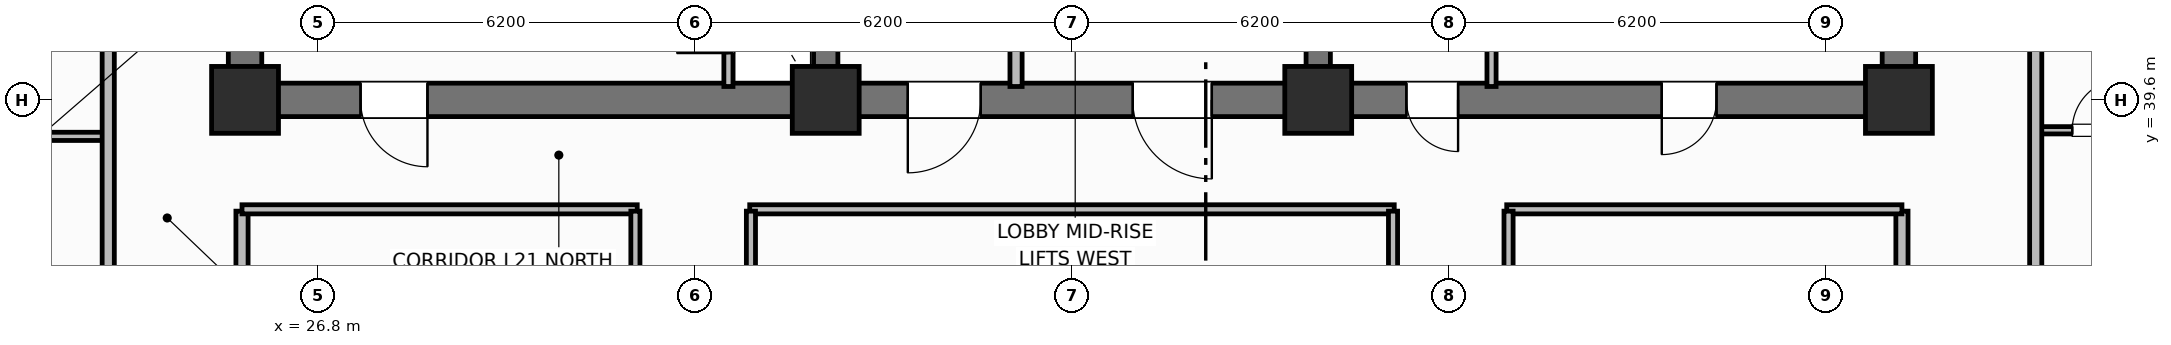
"""IFC4 building model, lengths in metres.
Left out: names, types, materials, properties, quantities, classifications, styles, units other than length and angle.
Written with IfcOpenShell. Run it as: python <this file> out.ifc"""

import sys

from ifc_helpers import new_model, si_unit, direction, frame, frame_2d, origin, origin_2d, place, context, subcontext, project, spatial, rectangle, extrude, element, fill, save


model = new_model("IFC4")
c1 = context("Model", 3, precision=1e-05, world=origin(), true_north=direction((0.0, 1.0)))
c2 = subcontext(c1, "Body", "Model", "MODEL_VIEW")
j1 = project(units=[si_unit("LENGTHUNIT", "METRE"), si_unit("PLANEANGLEUNIT", "RADIAN")], contexts=[c1])
p1 = place(None, origin())
s1 = spatial("IfcSite", under=j1, at=p1, CompositionType="ELEMENT")
p2 = place(p1, origin())
s2 = spatial("IfcBuilding", under=s1, at=p2, CompositionType="ELEMENT")
p3 = place(p2, frame((0.0, 0.0, 88.3)))
s3 = spatial("IfcBuildingStorey", under=s2, at=p3, CompositionType="ELEMENT", Elevation=88.3)
for number, where, z_axis, x_axis in (
    (1, (25.6, 39.875, 0.0), (0.0, 0.0, 1.0), (0.0, 1.0, 0.0)),
    (2, (52.8, 39.875, 0.0), (0.0, 0.0, 1.0), (0.0, 1.0, 0.0)),
):
    element("IfcWall", number, at=place(p3, frame(where, z_axis=z_axis, x_axis=x_axis)), inside=s3, PredefinedType="SHEAR", context=c2, shape_type="SweptSolid", body=[
        extrude(rectangle(XDim=5.65, YDim=0.55, at=frame_2d((2.825, 0.0))), origin(), (0.0, 0.0, 1.0), 3.7),
    ])
p4 = place(p3, frame((52.8, 39.6, 0.0), z_axis=(0.0, 0.0, 1.0), x_axis=(-1.0, 0.0, 0.0)))
e3 = element("IfcWall", 3, at=p4, inside=s3, PredefinedType="SHEAR", context=c2, shape_type="SweptSolid", body=[
    extrude(rectangle(XDim=27.2, YDim=0.55, at=frame_2d((13.6, 0.0))), origin(), (0.0, 0.0, 1.0), 3.7),
])
p5 = place(p4, frame((24.2, 0.0, 0.0)))
e4 = element("IfcOpeningElement", 4, at=p5, cuts=e3, PredefinedType="OPENING", context=c2, shape_type="SweptSolid", body=[
    extrude(rectangle(XDim=1.1, YDim=2.15, at=frame_2d((0.55, 1.075))), frame((0.0, 0.285, 0.0), z_axis=(0.0, -1.0, 0.0), x_axis=(1.0, 0.0, 0.0)), (0.0, 0.0, 1.0), 0.57),
])
p6 = place(p4, frame((15.1, 0.0, 0.0)))
e5 = element("IfcOpeningElement", 5, at=p6, cuts=e3, PredefinedType="OPENING", context=c2, shape_type="SweptSolid", body=[
    extrude(rectangle(XDim=1.2, YDim=2.15, at=frame_2d((0.6, 1.075))), frame((0.0, 0.285, 0.0), z_axis=(0.0, -1.0, 0.0), x_axis=(1.0, 0.0, 0.0)), (0.0, 0.0, 1.0), 0.57),
])
p7 = place(p4, frame((11.3, 0.0, 0.0)))
e6 = element("IfcOpeningElement", 6, at=p7, cuts=e3, PredefinedType="OPENING", context=c2, shape_type="SweptSolid", body=[
    extrude(rectangle(XDim=1.3, YDim=2.2, at=frame_2d((0.65, 1.1))), frame((0.0, 0.285, 0.0), z_axis=(0.0, -1.0, 0.0), x_axis=(1.0, 0.0, 0.0)), (0.0, 0.0, 1.0), 0.57),
])
p8 = place(p4, frame((7.25, 0.0, 0.0)))
e7 = element("IfcOpeningElement", 7, at=p8, cuts=e3, PredefinedType="OPENING", context=c2, shape_type="SweptSolid", body=[
    extrude(rectangle(XDim=0.85, YDim=2.1, at=frame_2d((0.425, 1.05))), frame((0.0, 0.285, 0.0), z_axis=(0.0, -1.0, 0.0), x_axis=(1.0, 0.0, 0.0)), (0.0, 0.0, 1.0), 0.57),
])
p9 = place(p4, frame((3.0, 0.0, 0.0)))
e8 = element("IfcOpeningElement", 8, at=p9, cuts=e3, PredefinedType="OPENING", context=c2, shape_type="SweptSolid", body=[
    extrude(rectangle(XDim=0.9, YDim=2.1, at=frame_2d((0.45, 1.05))), frame((0.0, 0.285, 0.0), z_axis=(0.0, -1.0, 0.0), x_axis=(1.0, 0.0, 0.0)), (0.0, 0.0, 1.0), 0.57),
])
for number, where, z_axis, x_axis in (
    (9, (35.15, 39.875, 0.0), (0.0, 0.0, 1.0), (0.0, 1.0, 0.0)),
    (10, (43.25, 39.875, 0.0), (0.0, 0.0, 1.0), (0.0, 1.0, 0.0)),
):
    element("IfcWall", number, at=place(p3, frame(where, z_axis=z_axis, x_axis=x_axis)), inside=s3, PredefinedType="SHEAR", context=c2, shape_type="SweptSolid", body=[
        extrude(rectangle(XDim=5.65, YDim=0.4, at=frame_2d((2.825, 0.0))), origin(), (0.0, 0.0, 1.0), 3.7),
    ])
for number, where, z_axis, x_axis in (
    (11, (25.6, 39.6, 0.0), (0.0, 0.0, 1.0), (1.0, 0.0, 0.0)),
    (12, (35.15, 39.6, 0.0), (0.0, 0.0, 1.0), (1.0, 0.0, 0.0)),
    (13, (43.25, 39.6, 0.0), (0.0, 0.0, 1.0), (1.0, 0.0, 0.0)),
    (14, (52.8, 39.6, 0.0), (0.0, 0.0, 1.0), (1.0, 0.0, 0.0)),
):
    element("IfcColumn", number, at=place(p3, frame(where, z_axis=z_axis, x_axis=x_axis)), inside=s3, PredefinedType="COLUMN", context=c2, shape_type="SweptSolid", body=[
        extrude(rectangle(XDim=1.1, YDim=1.1, at=origin_2d()), origin(), (0.0, 0.0, 1.0), 3.7),
    ])
p10 = place(p3, frame((33.55, 39.82, 0.0), z_axis=(0.0, 0.0, 1.0), x_axis=(0.0, 1.0, 0.0)))
e15 = element("IfcWall", 15, at=p10, inside=s3, PredefinedType="PARTITIONING", context=c2, shape_type="SweptSolid", body=[
    extrude(rectangle(XDim=2.13, YDim=0.15, at=frame_2d((1.065, 0.0))), origin(), (0.0, 0.0, 1.0), 2.53),
])
p11 = place(p10, frame((0.55, 0.0, 0.0)))
e16 = element("IfcOpeningElement", 16, at=p11, cuts=e15, PredefinedType="OPENING", context=c2, shape_type="SweptSolid", body=[
    extrude(rectangle(XDim=0.85, YDim=2.05, at=frame_2d((0.425, 1.025))), frame((0.0, 0.085, 0.0), z_axis=(0.0, -1.0, 0.0), x_axis=(1.0, 0.0, 0.0)), (0.0, 0.0, 1.0), 0.17),
])
p12 = place(p3, frame((38.28, 39.82, 0.0), z_axis=(0.0, 0.0, 1.0), x_axis=(0.0, 1.0, 0.0)))
e17 = element("IfcWall", 17, at=p12, inside=s3, PredefinedType="PARTITIONING", context=c2, shape_type="SweptSolid", body=[
    extrude(rectangle(XDim=2.73, YDim=0.2, at=frame_2d((1.365, 0.0))), origin(), (0.0, 0.0, 1.0), 2.53),
])
p13 = place(p3, frame((46.1, 39.82, 0.0), z_axis=(0.0, 0.0, 1.0), x_axis=(0.0, 1.0, 0.0)))
e18 = element("IfcWall", 18, at=p13, inside=s3, PredefinedType="PARTITIONING", context=c2, shape_type="SweptSolid", body=[
    extrude(rectangle(XDim=2.73, YDim=0.15, at=frame_2d((1.365, 0.0))), origin(), (0.0, 0.0, 1.0), 2.53),
])
for number, where, z_axis, x_axis in (
    (19, (25.55, 18.63, 0.0), (0.0, 0.0, 1.0), (0.0, 1.0, 0.0)),
    (20, (52.85, 18.63, 0.0), (0.0, 0.0, 1.0), (0.0, 1.0, 0.0)),
):
    element("IfcWall", number, at=place(p3, frame(where, z_axis=z_axis, x_axis=x_axis)), inside=s3, PredefinedType="PARTITIONING", context=c2, shape_type="SweptSolid", body=[
        extrude(rectangle(XDim=19.14, YDim=0.2, at=frame_2d((9.57, 0.0))), origin(), (0.0, 0.0, 1.0), 2.53),
    ])
p14 = place(p3, frame((25.55, 37.8, 0.0), z_axis=(0.0, 0.0, 1.0), x_axis=(1.0, 0.0, 0.0)))
e21 = element("IfcWall", 21, at=p14, inside=s3, PredefinedType="PARTITIONING", context=c2, shape_type="SweptSolid", body=[
    extrude(rectangle(XDim=6.5, YDim=0.15, at=frame_2d((3.25, 0.0))), origin(), (0.0, 0.0, 1.0), 2.53),
])
p15 = place(p3, frame((33.9, 37.8, 0.0), z_axis=(0.0, 0.0, 1.0), x_axis=(1.0, 0.0, 0.0)))
e22 = element("IfcWall", 22, at=p15, inside=s3, PredefinedType="PARTITIONING", context=c2, shape_type="SweptSolid", body=[
    extrude(rectangle(XDim=10.6, YDim=0.15, at=frame_2d((5.3, 0.0))), origin(), (0.0, 0.0, 1.0), 2.53),
])
p16 = place(p3, frame((46.35, 37.8, 0.0), z_axis=(0.0, 0.0, 1.0), x_axis=(1.0, 0.0, 0.0)))
e23 = element("IfcWall", 23, at=p16, inside=s3, PredefinedType="PARTITIONING", context=c2, shape_type="SweptSolid", body=[
    extrude(rectangle(XDim=6.5, YDim=0.15, at=frame_2d((3.25, 0.0))), origin(), (0.0, 0.0, 1.0), 2.53),
])
p17 = place(p3, frame((32.02, 18.63, 0.0), z_axis=(0.0, 0.0, 1.0), x_axis=(0.0, 1.0, 0.0)))
e24 = element("IfcWall", 24, at=p17, inside=s3, PredefinedType="PARTITIONING", context=c2, shape_type="SweptSolid", body=[
    extrude(rectangle(XDim=19.14, YDim=0.15, at=frame_2d((9.57, 0.0))), origin(), (0.0, 0.0, 1.0), 2.53),
])
p18 = place(p17, frame((3.0, 0.0, 0.0)))
e25 = element("IfcOpeningElement", 25, at=p18, cuts=e24, PredefinedType="OPENING", context=c2, shape_type="SweptSolid", body=[
    extrude(rectangle(XDim=0.9, YDim=2.1, at=frame_2d((0.45, 1.05))), frame((0.0, 0.085, 0.0), z_axis=(0.0, -1.0, 0.0), x_axis=(1.0, 0.0, 0.0)), (0.0, 0.0, 1.0), 0.17),
])
p19 = place(p17, frame((11.5, 0.0, 0.0)))
e26 = element("IfcOpeningElement", 26, at=p19, cuts=e24, PredefinedType="OPENING", context=c2, shape_type="SweptSolid", body=[
    extrude(rectangle(XDim=0.9, YDim=2.1, at=frame_2d((0.45, 1.05))), frame((0.0, 0.085, 0.0), z_axis=(0.0, -1.0, 0.0), x_axis=(1.0, 0.0, 0.0)), (0.0, 0.0, 1.0), 0.17),
])
p20 = place(p3, frame((33.92, 18.63, 0.0), z_axis=(0.0, 0.0, 1.0), x_axis=(0.0, 1.0, 0.0)))
e27 = element("IfcWall", 27, at=p20, inside=s3, PredefinedType="PARTITIONING", context=c2, shape_type="SweptSolid", body=[
    extrude(rectangle(XDim=19.14, YDim=0.15, at=frame_2d((9.57, 0.0))), origin(), (0.0, 0.0, 1.0), 2.53),
])
p21 = place(p20, frame((2.4, 0.0, 0.0)))
e28 = element("IfcOpeningElement", 28, at=p21, cuts=e27, PredefinedType="OPENING", context=c2, shape_type="SweptSolid", body=[
    extrude(rectangle(XDim=0.9, YDim=2.1, at=frame_2d((0.45, 1.05))), frame((0.0, 0.085, 0.0), z_axis=(0.0, -1.0, 0.0), x_axis=(1.0, 0.0, 0.0)), (0.0, 0.0, 1.0), 0.17),
])
p22 = place(p3, frame((44.48, 18.63, 0.0), z_axis=(0.0, 0.0, 1.0), x_axis=(0.0, 1.0, 0.0)))
e29 = element("IfcWall", 29, at=p22, inside=s3, PredefinedType="PARTITIONING", context=c2, shape_type="SweptSolid", body=[
    extrude(rectangle(XDim=19.14, YDim=0.15, at=frame_2d((9.57, 0.0))), origin(), (0.0, 0.0, 1.0), 2.53),
])
p23 = place(p22, frame((8.89, 0.0, 0.0)))
e30 = element("IfcOpeningElement", 30, at=p23, cuts=e29, PredefinedType="OPENING", context=c2, shape_type="SweptSolid", body=[
    extrude(rectangle(XDim=0.9, YDim=2.1, at=frame_2d((0.45, 1.05))), frame((0.0, 0.085, 0.0), z_axis=(0.0, -1.0, 0.0), x_axis=(1.0, 0.0, 0.0)), (0.0, 0.0, 1.0), 0.17),
])
p24 = place(p3, frame((46.38, 18.63, 0.0), z_axis=(0.0, 0.0, 1.0), x_axis=(0.0, 1.0, 0.0)))
e31 = element("IfcWall", 31, at=p24, inside=s3, PredefinedType="PARTITIONING", context=c2, shape_type="SweptSolid", body=[
    extrude(rectangle(XDim=19.14, YDim=0.15, at=frame_2d((9.57, 0.0))), origin(), (0.0, 0.0, 1.0), 2.53),
])
p25 = place(p24, frame((5.5, 0.0, 0.0)))
e32 = element("IfcOpeningElement", 32, at=p25, cuts=e31, PredefinedType="OPENING", context=c2, shape_type="SweptSolid", body=[
    extrude(rectangle(XDim=1.0, YDim=2.15, at=frame_2d((0.5, 1.075))), frame((0.0, 0.085, 0.0), z_axis=(0.0, -1.0, 0.0), x_axis=(1.0, 0.0, 0.0)), (0.0, 0.0, 1.0), 0.17),
])
p26 = place(p3, frame((21.1, 39.0, 0.0), z_axis=(0.0, 0.0, 1.0), x_axis=(1.0, 0.0, 0.0)))
e33 = element("IfcWall", 33, at=p26, inside=s3, PredefinedType="PARTITIONING", context=c2, shape_type="SweptSolid", body=[
    extrude(rectangle(XDim=2.25, YDim=0.135, at=frame_2d((1.125, 0.0))), origin(), (0.0, 0.0, 1.0), 2.53),
])
p27 = place(p3, frame((23.35, 10.6, 0.0), z_axis=(0.0, 0.0, 1.0), x_axis=(0.0, 1.0, 0.0)))
e34 = element("IfcWall", 34, at=p27, inside=s3, PredefinedType="PARTITIONING", context=c2, shape_type="SweptSolid", body=[
    extrude(rectangle(XDim=35.2, YDim=0.2, at=frame_2d((17.6, 0.0))), origin(), (0.0, 0.0, 1.0), 2.53),
])
p28 = place(p27, frame((2.65, 0.0, 0.0)))
e35 = element("IfcOpeningElement", 35, at=p28, cuts=e34, PredefinedType="OPENING", context=c2, shape_type="SweptSolid", body=[
    extrude(rectangle(XDim=1.0, YDim=2.15, at=frame_2d((0.5, 1.075))), frame((0.0, 0.11, 0.0), z_axis=(0.0, -1.0, 0.0), x_axis=(1.0, 0.0, 0.0)), (0.0, 0.0, 1.0), 0.22),
])
p29 = place(p27, frame((22.75, 0.0, 0.0)))
e36 = element("IfcOpeningElement", 36, at=p29, cuts=e34, PredefinedType="OPENING", context=c2, shape_type="SweptSolid", body=[
    extrude(rectangle(XDim=1.0, YDim=2.15, at=frame_2d((0.5, 1.075))), frame((0.0, 0.11, 0.0), z_axis=(0.0, -1.0, 0.0), x_axis=(1.0, 0.0, 0.0)), (0.0, 0.0, 1.0), 0.22),
])
p30 = place(p3, frame((55.05, 39.1, 0.0), z_axis=(0.0, 0.0, 1.0), x_axis=(1.0, 0.0, 0.0)))
e37 = element("IfcWall", 37, at=p30, inside=s3, PredefinedType="PARTITIONING", context=c2, shape_type="SweptSolid", body=[
    extrude(rectangle(XDim=2.25, YDim=0.12, at=frame_2d((1.125, 0.0))), origin(), (0.0, 0.0, 1.0), 2.53),
])
p31 = place(p30, frame((0.6, 0.0, 0.0)))
e38 = element("IfcOpeningElement", 38, at=p31, cuts=e37, PredefinedType="OPENING", context=c2, shape_type="SweptSolid", body=[
    extrude(rectangle(XDim=0.85, YDim=2.1, at=frame_2d((0.425, 1.05))), frame((0.0, 0.07, 0.0), z_axis=(0.0, -1.0, 0.0), x_axis=(1.0, 0.0, 0.0)), (0.0, 0.0, 1.0), 0.14),
])
p32 = place(p3, frame((55.05, 10.6, 0.0), z_axis=(0.0, 0.0, 1.0), x_axis=(0.0, 1.0, 0.0)))
e39 = element("IfcWall", 39, at=p32, inside=s3, PredefinedType="PARTITIONING", context=c2, shape_type="SweptSolid", body=[
    extrude(rectangle(XDim=35.2, YDim=0.2, at=frame_2d((17.6, 0.0))), origin(), (0.0, 0.0, 1.0), 2.53),
])
p33 = place(p32, frame((2.65, 0.0, 0.0)))
e40 = element("IfcOpeningElement", 40, at=p33, cuts=e39, PredefinedType="OPENING", context=c2, shape_type="SweptSolid", body=[
    extrude(rectangle(XDim=1.0, YDim=2.15, at=frame_2d((0.5, 1.075))), frame((0.0, 0.11, 0.0), z_axis=(0.0, -1.0, 0.0), x_axis=(1.0, 0.0, 0.0)), (0.0, 0.0, 1.0), 0.22),
])
p34 = place(p32, frame((11.814, 0.0, 0.0)))
e41 = element("IfcOpeningElement", 41, at=p34, cuts=e39, PredefinedType="OPENING", context=c2, shape_type="SweptSolid", body=[
    extrude(rectangle(XDim=1.0, YDim=2.15, at=frame_2d((0.5, 1.075))), frame((0.0, 0.11, 0.0), z_axis=(0.0, -1.0, 0.0), x_axis=(1.0, 0.0, 0.0)), (0.0, 0.0, 1.0), 0.22),
])
p35 = place(p32, frame((23.65, 0.0, 0.0)))
e42 = element("IfcOpeningElement", 42, at=p35, cuts=e39, PredefinedType="OPENING", context=c2, shape_type="SweptSolid", body=[
    extrude(rectangle(XDim=1.0, YDim=2.15, at=frame_2d((0.5, 1.075))), frame((0.0, 0.11, 0.0), z_axis=(0.0, -1.0, 0.0), x_axis=(1.0, 0.0, 0.0)), (0.0, 0.0, 1.0), 0.22),
])
p36 = place(p11, origin())
e43 = element("IfcDoor", 43, at=p36, inside=s3, OperationType="SINGLE_SWING_LEFT", PredefinedType="TRAPDOOR", context=c2, shape_type="SweptSolid", body=[
    extrude(rectangle(XDim=0.85, YDim=2.05, at=frame_2d((0.425, 1.025))), frame((0.0, 0.025, 0.0), z_axis=(0.0, -1.0, 0.0), x_axis=(1.0, 0.0, 0.0)), (0.0, 0.0, 1.0), 0.05),
])
fill(e16, e43)
p37 = place(p31, origin())
e44 = element("IfcDoor", 44, at=p37, inside=s3, OperationType="SINGLE_SWING_RIGHT", PredefinedType="DOOR", context=c2, shape_type="SweptSolid", body=[
    extrude(rectangle(XDim=0.85, YDim=2.1, at=frame_2d((0.425, 1.05))), frame((0.0, 0.025, 0.0), z_axis=(0.0, -1.0, 0.0), x_axis=(1.0, 0.0, 0.0)), (0.0, 0.0, 1.0), 0.05),
])
fill(e38, e44)
p38 = place(p5, origin())
e45 = element("IfcDoor", 45, at=p38, inside=s3, OperationType="SINGLE_SWING_LEFT", PredefinedType="DOOR", context=c2, shape_type="SweptSolid", body=[
    extrude(rectangle(XDim=1.1, YDim=2.15, at=frame_2d((0.55, 1.075))), frame((0.0, 0.025, 0.0), z_axis=(0.0, -1.0, 0.0), x_axis=(1.0, 0.0, 0.0)), (0.0, 0.0, 1.0), 0.05),
])
fill(e4, e45)
p39 = place(p6, origin())
e46 = element("IfcDoor", 46, at=p39, inside=s3, OperationType="SINGLE_SWING_RIGHT", PredefinedType="DOOR", context=c2, shape_type="SweptSolid", body=[
    extrude(rectangle(XDim=1.2, YDim=2.15, at=frame_2d((0.6, 1.075))), frame((0.0, 0.025, 0.0), z_axis=(0.0, -1.0, 0.0), x_axis=(1.0, 0.0, 0.0)), (0.0, 0.0, 1.0), 0.05),
])
fill(e5, e46)
p40 = place(p7, origin())
e47 = element("IfcDoor", 47, at=p40, inside=s3, OperationType="SINGLE_SWING_LEFT", PredefinedType="DOOR", context=c2, shape_type="SweptSolid", body=[
    extrude(rectangle(XDim=1.3, YDim=2.2, at=frame_2d((0.65, 1.1))), frame((0.0, 0.025, 0.0), z_axis=(0.0, -1.0, 0.0), x_axis=(1.0, 0.0, 0.0)), (0.0, 0.0, 1.0), 0.05),
])
fill(e6, e47)
p41 = place(p8, origin())
e48 = element("IfcDoor", 48, at=p41, inside=s3, OperationType="SINGLE_SWING_LEFT", PredefinedType="DOOR", context=c2, shape_type="SweptSolid", body=[
    extrude(rectangle(XDim=0.85, YDim=2.1, at=frame_2d((0.425, 1.05))), frame((0.0, 0.025, 0.0), z_axis=(0.0, -1.0, 0.0), x_axis=(1.0, 0.0, 0.0)), (0.0, 0.0, 1.0), 0.05),
])
fill(e7, e48)
p42 = place(p9, origin())
e49 = element("IfcDoor", 49, at=p42, inside=s3, OperationType="SINGLE_SWING_RIGHT", PredefinedType="DOOR", context=c2, shape_type="SweptSolid", body=[
    extrude(rectangle(XDim=0.9, YDim=2.1, at=frame_2d((0.45, 1.05))), frame((0.0, 0.025, 0.0), z_axis=(0.0, -1.0, 0.0), x_axis=(1.0, 0.0, 0.0)), (0.0, 0.0, 1.0), 0.05),
])
fill(e8, e49)
save(model, sys.argv[1])
